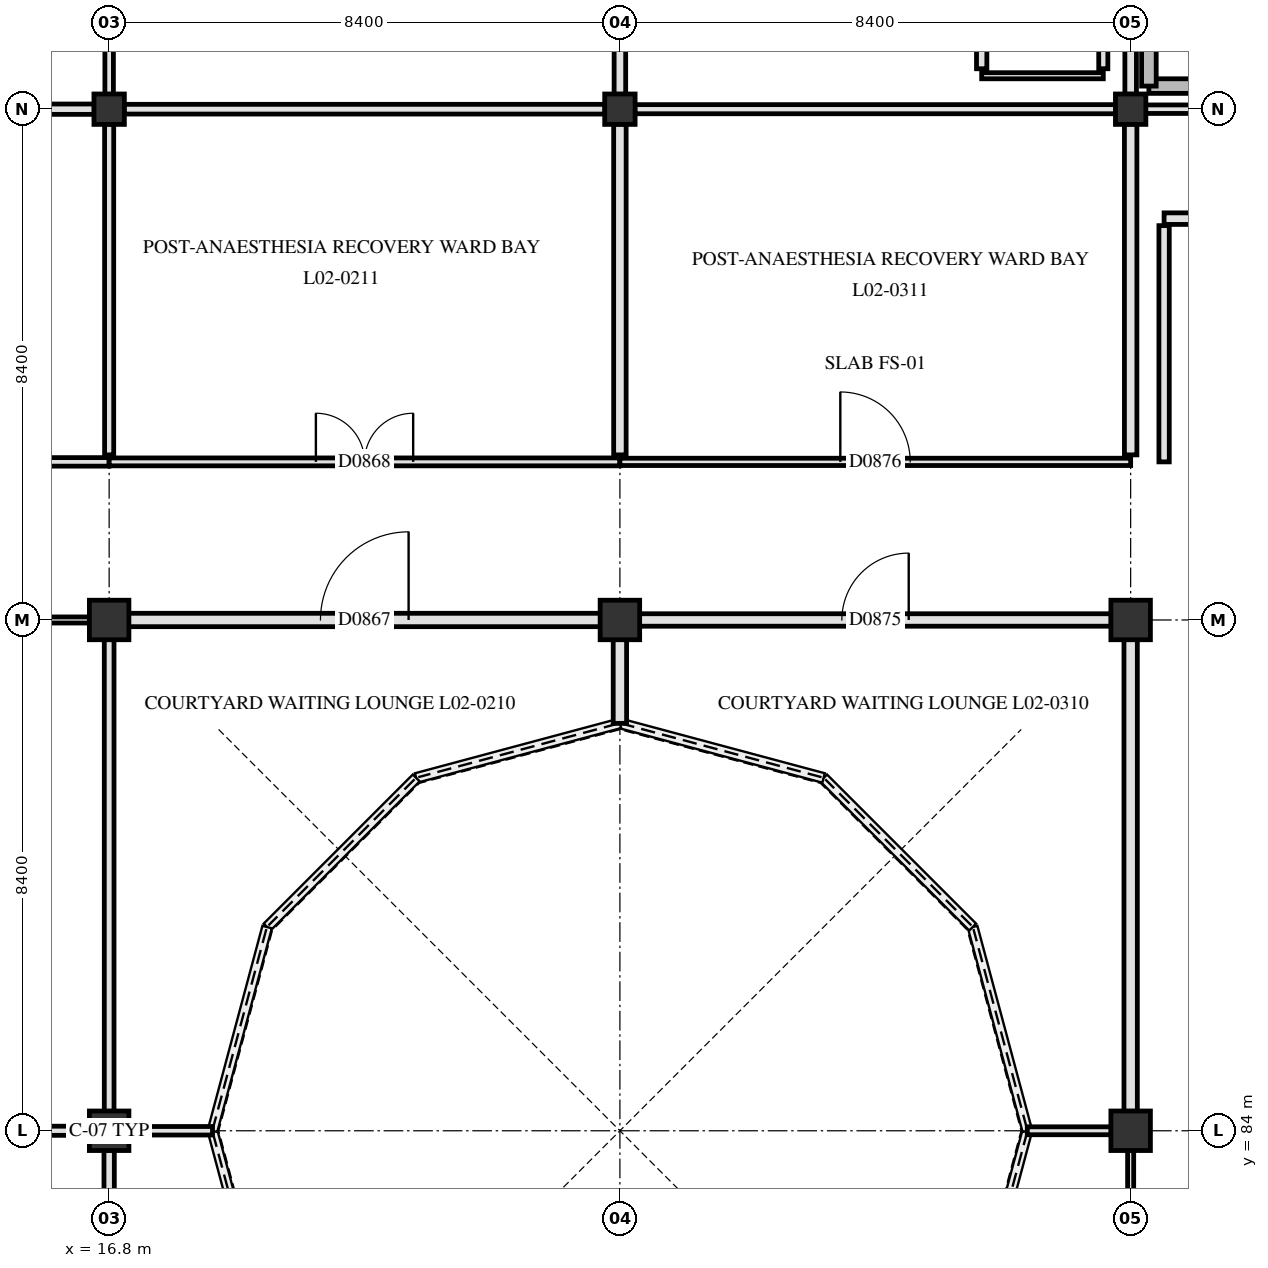
"""IFC4 building model, lengths in metres.
Left out: names, types, materials, properties, quantities, classifications, styles, units other than length and angle.
Written with IfcOpenShell. Run it as: python <this file> out.ifc"""

import sys

from ifc_helpers import new_model, si_unit, direction, frame, frame_2d, origin, origin_2d, place, context, subcontext, project, spatial, rectangle, circle, extrude, element, fill, save


model = new_model("IFC4")
c1 = context("Model", 3, precision=1e-05, world=origin(), true_north=direction((0.0, 1.0)))
c2 = subcontext(c1, "Body", "Model", "MODEL_VIEW")
j1 = project(units=[si_unit("LENGTHUNIT", "METRE"), si_unit("PLANEANGLEUNIT", "RADIAN")], contexts=[c1])
p1 = place(None, origin())
s1 = spatial("IfcSite", under=j1, at=p1, CompositionType="ELEMENT")
p2 = place(p1, origin())
s2 = spatial("IfcBuilding", under=s1, at=p2, CompositionType="ELEMENT")
p3 = place(p2, frame((0.0, 0.0, 9.3)))
s3 = spatial("IfcBuildingStorey", under=s2, at=p3, CompositionType="ELEMENT", Elevation=9.3)
for number, where, z_axis, x_axis in (
    (1, (16.8, 84.0, 0.0), (0.0, 0.0, 1.0), (1.0, 0.0, 0.0)),
    (2, (16.8, 92.4, 0.0), (0.0, 0.0, 1.0), (1.0, 0.0, 0.0)),
):
    element("IfcColumn", number, at=place(p3, frame(where, z_axis=z_axis, x_axis=x_axis)), inside=s3, PredefinedType="COLUMN", context=c2, shape_type="SweptSolid", body=[
        extrude(circle(Radius=0.325, at=origin_2d()), origin(), (0.0, 0.0, 1.0), 5.1),
    ])
p4 = place(p3, frame((16.8, 100.8, 0.0), z_axis=(0.0, 0.0, 1.0), x_axis=(1.0, 0.0, 0.0)))
e3 = element("IfcColumn", 3, at=p4, inside=s3, PredefinedType="COLUMN", context=c2, shape_type="SweptSolid", body=[
    extrude(rectangle(XDim=0.5, YDim=0.5, at=origin_2d()), origin(), (0.0, 0.0, 1.0), 5.1),
])
p5 = place(p3, frame((25.2, 92.4, 0.0), z_axis=(0.0, 0.0, 1.0), x_axis=(1.0, 0.0, 0.0)))
e4 = element("IfcColumn", 4, at=p5, inside=s3, PredefinedType="COLUMN", context=c2, shape_type="SweptSolid", body=[
    extrude(circle(Radius=0.325, at=origin_2d()), origin(), (0.0, 0.0, 1.0), 5.1),
])
p6 = place(p3, frame((25.2, 100.8, 0.0), z_axis=(0.0, 0.0, 1.0), x_axis=(1.0, 0.0, 0.0)))
e5 = element("IfcColumn", 5, at=p6, inside=s3, PredefinedType="COLUMN", context=c2, shape_type="SweptSolid", body=[
    extrude(rectangle(XDim=0.5, YDim=0.5, at=origin_2d()), origin(), (0.0, 0.0, 1.0), 5.1),
])
for number, where, z_axis, x_axis in (
    (6, (33.6, 84.0, 0.0), (0.0, 0.0, 1.0), (1.0, 0.0, 0.0)),
    (7, (33.6, 92.4, 0.0), (0.0, 0.0, 1.0), (1.0, 0.0, 0.0)),
):
    element("IfcColumn", number, at=place(p3, frame(where, z_axis=z_axis, x_axis=x_axis)), inside=s3, PredefinedType="COLUMN", context=c2, shape_type="SweptSolid", body=[
        extrude(circle(Radius=0.325, at=origin_2d()), origin(), (0.0, 0.0, 1.0), 5.1),
    ])
p7 = place(p3, frame((33.6, 100.8, 0.0), z_axis=(0.0, 0.0, 1.0), x_axis=(1.0, 0.0, 0.0)))
e8 = element("IfcColumn", 8, at=p7, inside=s3, PredefinedType="COLUMN", context=c2, shape_type="SweptSolid", body=[
    extrude(rectangle(XDim=0.5, YDim=0.5, at=origin_2d()), origin(), (0.0, 0.0, 1.0), 5.1),
])
p8 = place(p3, frame((33.9, 101.18, 0.0), z_axis=(0.0, 0.0, 1.0), x_axis=(1.0, 0.0, 0.0)))
e9 = element("IfcWall", 9, at=p8, inside=s3, PredefinedType="SHEAR", context=c2, shape_type="SweptSolid", body=[
    extrude(rectangle(XDim=7.82, YDim=0.24, at=frame_2d((3.91, 0.0))), origin(), (0.0, 0.0, 1.0), 4.78),
])
p9 = place(p3, frame((33.9, 101.18, 0.0), z_axis=(0.0, 0.0, 1.0), x_axis=(0.0, 1.0, 0.0)))
e10 = element("IfcWall", 10, at=p9, inside=s3, PredefinedType="SHEAR", context=c2, shape_type="SweptSolid", body=[
    extrude(rectangle(XDim=3.32, YDim=0.24, at=frame_2d((1.66, 0.0))), origin(), (0.0, 0.0, 1.0), 4.78),
])
p10 = place(p3, frame((8.645, 84.0, 0.0), z_axis=(0.0, 0.0, 1.0), x_axis=(1.0, 0.0, 0.0)))
e11 = element("IfcWall", 11, at=p10, inside=s3, PredefinedType="PARTITIONING", context=c2, shape_type="SweptSolid", body=[
    extrude(rectangle(XDim=7.835, YDim=0.15, at=frame_2d((3.917, 0.0))), origin(), (0.0, 0.0, 1.0), 4.02),
])
p11 = place(p3, frame((17.12, 84.0, 0.0), z_axis=(0.0, 0.0, 1.0), x_axis=(1.0, 0.0, 0.0)))
e12 = element("IfcWall", 12, at=p11, inside=s3, PredefinedType="PARTITIONING", context=c2, shape_type="SweptSolid", body=[
    extrude(rectangle(XDim=1.38, YDim=0.14, at=frame_2d((0.69, 0.0))), origin(), (0.0, 0.0, 1.0), 4.77),
])
p12 = place(p3, frame((31.9, 84.0, 0.0), z_axis=(0.0, 0.0, 1.0), x_axis=(1.0, 0.0, 0.0)))
e13 = element("IfcWall", 13, at=p12, inside=s3, PredefinedType="PARTITIONING", context=c2, shape_type="SweptSolid", body=[
    extrude(rectangle(XDim=1.38, YDim=0.13, at=frame_2d((0.69, 0.0))), origin(), (0.0, 0.0, 1.0), 4.77),
])
p13 = place(p3, frame((8.645, 92.4, 0.0), z_axis=(0.0, 0.0, 1.0), x_axis=(1.0, 0.0, 0.0)))
e14 = element("IfcWall", 14, at=p13, inside=s3, PredefinedType="PARTITIONING", context=c2, shape_type="SweptSolid", body=[
    extrude(rectangle(XDim=7.835, YDim=0.1, at=frame_2d((3.917, 0.0))), origin(), (0.0, 0.0, 1.0), 4.02),
])
p14 = place(p13, frame((3.327, 0.0, 0.0)))
e15 = element("IfcOpeningElement", 15, at=p14, cuts=e14, PredefinedType="OPENING", context=c2, shape_type="SweptSolid", body=[
    extrude(rectangle(XDim=1.18, YDim=2.18, at=frame_2d((0.59, 1.09))), frame((0.0, 0.06, 0.0), z_axis=(0.0, -1.0, 0.0), x_axis=(1.0, 0.0, 0.0)), (0.0, 0.0, 1.0), 0.12),
])
p15 = place(p3, frame((17.12, 92.4, 0.0), z_axis=(0.0, 0.0, 1.0), x_axis=(1.0, 0.0, 0.0)))
e16 = element("IfcWall", 16, at=p15, inside=s3, PredefinedType="PARTITIONING", context=c2, shape_type="SweptSolid", body=[
    extrude(rectangle(XDim=7.76, YDim=0.22, at=frame_2d((3.88, 0.0))), origin(), (0.0, 0.0, 1.0), 4.02),
])
p16 = place(p15, frame((3.155, 0.0, 0.0)))
e17 = element("IfcOpeningElement", 17, at=p16, cuts=e16, PredefinedType="OPENING", context=c2, shape_type="SweptSolid", body=[
    extrude(rectangle(XDim=1.45, YDim=2.2, at=frame_2d((0.725, 1.1))), frame((0.0, 0.12, 0.0), z_axis=(0.0, -1.0, 0.0), x_axis=(1.0, 0.0, 0.0)), (0.0, 0.0, 1.0), 0.24),
])
p17 = place(p3, frame((25.52, 92.4, 0.0), z_axis=(0.0, 0.0, 1.0), x_axis=(1.0, 0.0, 0.0)))
e18 = element("IfcWall", 18, at=p17, inside=s3, PredefinedType="PARTITIONING", context=c2, shape_type="SweptSolid", body=[
    extrude(rectangle(XDim=7.76, YDim=0.205, at=frame_2d((3.88, 0.0))), origin(), (0.0, 0.0, 1.0), 4.02),
])
p18 = place(p17, frame((3.33, 0.0, 0.0)))
e19 = element("IfcOpeningElement", 19, at=p18, cuts=e18, PredefinedType="OPENING", context=c2, shape_type="SweptSolid", body=[
    extrude(rectangle(XDim=1.1, YDim=2.15, at=frame_2d((0.55, 1.075))), frame((0.0, 0.113, 0.0), z_axis=(0.0, -1.0, 0.0), x_axis=(1.0, 0.0, 0.0)), (0.0, 0.0, 1.0), 0.225),
])
p19 = place(p3, frame((8.4, 95.0, 0.0), z_axis=(0.0, 0.0, 1.0), x_axis=(1.0, 0.0, 0.0)))
e20 = element("IfcWall", 20, at=p19, inside=s3, PredefinedType="PARTITIONING", context=c2, shape_type="SweptSolid", body=[
    extrude(rectangle(XDim=8.4, YDim=0.14, at=frame_2d((4.2, 0.0))), origin(), (0.0, 0.0, 1.0), 4.17),
])
p20 = place(p19, frame((3.56, 0.0, 0.0)))
e21 = element("IfcOpeningElement", 21, at=p20, cuts=e20, PredefinedType="OPENING", context=c2, shape_type="SweptSolid", body=[
    extrude(rectangle(XDim=1.28, YDim=2.18, at=frame_2d((0.64, 1.09))), frame((0.0, 0.08, 0.0), z_axis=(0.0, -1.0, 0.0), x_axis=(1.0, 0.0, 0.0)), (0.0, 0.0, 1.0), 0.16),
])
p21 = place(p3, frame((16.8, 95.0, 0.0), z_axis=(0.0, 0.0, 1.0), x_axis=(1.0, 0.0, 0.0)))
e22 = element("IfcWall", 22, at=p21, inside=s3, PredefinedType="PARTITIONING", context=c2, shape_type="SweptSolid", body=[
    extrude(rectangle(XDim=8.4, YDim=0.13, at=frame_2d((4.2, 0.0))), origin(), (0.0, 0.0, 1.0), 4.17),
])
p22 = place(p21, frame((3.4, 0.0, 0.0)))
e23 = element("IfcOpeningElement", 23, at=p22, cuts=e22, PredefinedType="OPENING", context=c2, shape_type="SweptSolid", body=[
    extrude(rectangle(XDim=1.6, YDim=2.25, at=frame_2d((0.8, 1.125))), frame((0.0, 0.075, 0.0), z_axis=(0.0, -1.0, 0.0), x_axis=(1.0, 0.0, 0.0)), (0.0, 0.0, 1.0), 0.15),
])
p23 = place(p3, frame((25.2, 95.0, 0.0), z_axis=(0.0, 0.0, 1.0), x_axis=(1.0, 0.0, 0.0)))
e24 = element("IfcWall", 24, at=p23, inside=s3, PredefinedType="PARTITIONING", context=c2, shape_type="SweptSolid", body=[
    extrude(rectangle(XDim=8.4, YDim=0.12, at=frame_2d((4.2, 0.0))), origin(), (0.0, 0.0, 1.0), 4.17),
])
p24 = place(p23, frame((3.625, 0.0, 0.0)))
e25 = element("IfcOpeningElement", 25, at=p24, cuts=e24, PredefinedType="OPENING", context=c2, shape_type="SweptSolid", body=[
    extrude(rectangle(XDim=1.15, YDim=2.15, at=frame_2d((0.575, 1.075))), frame((0.0, 0.07, 0.0), z_axis=(0.0, -1.0, 0.0), x_axis=(1.0, 0.0, 0.0)), (0.0, 0.0, 1.0), 0.14),
])
p25 = place(p3, frame((34.15, 99.0, 0.0), z_axis=(0.0, 0.0, 1.0), x_axis=(1.0, 0.0, 0.0)))
e26 = element("IfcWall", 26, at=p25, inside=s3, PredefinedType="PARTITIONING", context=c2, shape_type="SweptSolid", body=[
    extrude(rectangle(XDim=2.1, YDim=0.19, at=frame_2d((1.05, 0.0))), origin(), (0.0, 0.0, 1.0), 4.77),
])
p26 = place(p3, frame((8.645, 100.8, 0.0), z_axis=(0.0, 0.0, 1.0), x_axis=(1.0, 0.0, 0.0)))
e27 = element("IfcWall", 27, at=p26, inside=s3, PredefinedType="PARTITIONING", context=c2, shape_type="SweptSolid", body=[
    extrude(rectangle(XDim=7.91, YDim=0.17, at=frame_2d((3.955, 0.0))), origin(), (0.0, 0.0, 1.0), 4.02),
])
p27 = place(p3, frame((17.045, 100.8, 0.0), z_axis=(0.0, 0.0, 1.0), x_axis=(1.0, 0.0, 0.0)))
e28 = element("IfcWall", 28, at=p27, inside=s3, PredefinedType="PARTITIONING", context=c2, shape_type="SweptSolid", body=[
    extrude(rectangle(XDim=7.91, YDim=0.16, at=frame_2d((3.955, 0.0))), origin(), (0.0, 0.0, 1.0), 4.02),
])
p28 = place(p3, frame((25.445, 100.8, 0.0), z_axis=(0.0, 0.0, 1.0), x_axis=(1.0, 0.0, 0.0)))
e29 = element("IfcWall", 29, at=p28, inside=s3, PredefinedType="PARTITIONING", context=c2, shape_type="SweptSolid", body=[
    extrude(rectangle(XDim=7.91, YDim=0.15, at=frame_2d((3.955, 0.0))), origin(), (0.0, 0.0, 1.0), 4.02),
])
p29 = place(p3, frame((33.845, 100.8, 0.0), z_axis=(0.0, 0.0, 1.0), x_axis=(1.0, 0.0, 0.0)))
e30 = element("IfcWall", 30, at=p29, inside=s3, PredefinedType="PARTITIONING", context=c2, shape_type="SweptSolid", body=[
    extrude(rectangle(XDim=7.86, YDim=0.14, at=frame_2d((3.93, 0.0))), origin(), (0.0, 0.0, 1.0), 4.02),
])
p30 = place(p3, frame((31.15, 101.35, 0.0), z_axis=(0.0, 0.0, 1.0), x_axis=(1.0, 0.0, 0.0)))
e31 = element("IfcWall", 31, at=p30, inside=s3, PredefinedType="PARTITIONING", context=c2, shape_type="SweptSolid", body=[
    extrude(rectangle(XDim=2.0, YDim=0.1, at=frame_2d((1.0, 0.0))), origin(), (0.0, 0.0, 1.0), 4.77),
])
p31 = place(p3, frame((16.8, 78.315, 0.0), z_axis=(0.0, 0.0, 1.0), x_axis=(0.0, 1.0, 0.0)))
e32 = element("IfcWall", 32, at=p31, inside=s3, PredefinedType="PARTITIONING", context=c2, shape_type="SweptSolid", body=[
    extrude(rectangle(XDim=5.365, YDim=0.17, at=frame_2d((2.683, 0.0))), origin(), (0.0, 0.0, 1.0), 4.17),
])
p32 = place(p3, frame((16.8, 84.32, 0.0), z_axis=(0.0, 0.0, 1.0), x_axis=(0.0, 1.0, 0.0)))
e33 = element("IfcWall", 33, at=p32, inside=s3, PredefinedType="PARTITIONING", context=c2, shape_type="SweptSolid", body=[
    extrude(rectangle(XDim=7.76, YDim=0.16, at=frame_2d((3.88, 0.0))), origin(), (0.0, 0.0, 1.0), 4.17),
])
p33 = place(p3, frame((16.8, 95.115, 0.0), z_axis=(0.0, 0.0, 1.0), x_axis=(0.0, 1.0, 0.0)))
e34 = element("IfcWall", 34, at=p33, inside=s3, PredefinedType="PARTITIONING", context=c2, shape_type="SweptSolid", body=[
    extrude(rectangle(XDim=5.44, YDim=0.15, at=frame_2d((2.72, 0.0))), origin(), (0.0, 0.0, 1.0), 4.17),
])
p34 = place(p3, frame((16.8, 101.045, 0.0), z_axis=(0.0, 0.0, 1.0), x_axis=(0.0, 1.0, 0.0)))
e35 = element("IfcWall", 35, at=p34, inside=s3, PredefinedType="PARTITIONING", context=c2, shape_type="SweptSolid", body=[
    extrude(rectangle(XDim=5.44, YDim=0.14, at=frame_2d((2.72, 0.0))), origin(), (0.0, 0.0, 1.0), 4.17),
])
p35 = place(p3, frame((25.2, 90.7, 0.0), z_axis=(0.0, 0.0, 1.0), x_axis=(0.0, 1.0, 0.0)))
e36 = element("IfcWall", 36, at=p35, inside=s3, PredefinedType="PARTITIONING", context=c2, shape_type="SweptSolid", body=[
    extrude(rectangle(XDim=1.38, YDim=0.22, at=frame_2d((0.69, 0.0))), origin(), (0.0, 0.0, 1.0), 4.77),
])
p36 = place(p3, frame((25.2, 95.115, 0.0), z_axis=(0.0, 0.0, 1.0), x_axis=(0.0, 1.0, 0.0)))
e37 = element("IfcWall", 37, at=p36, inside=s3, PredefinedType="PARTITIONING", context=c2, shape_type="SweptSolid", body=[
    extrude(rectangle(XDim=5.44, YDim=0.205, at=frame_2d((2.72, 0.0))), origin(), (0.0, 0.0, 1.0), 4.17),
])
p37 = place(p3, frame((25.2, 101.045, 0.0), z_axis=(0.0, 0.0, 1.0), x_axis=(0.0, 1.0, 0.0)))
e38 = element("IfcWall", 38, at=p37, inside=s3, PredefinedType="PARTITIONING", context=c2, shape_type="SweptSolid", body=[
    extrude(rectangle(XDim=5.44, YDim=0.19, at=frame_2d((2.72, 0.0))), origin(), (0.0, 0.0, 1.0), 4.17),
])
p38 = place(p3, frame((31.15, 101.465, 0.0), z_axis=(0.0, 0.0, 1.0), x_axis=(0.0, 1.0, 0.0)))
e39 = element("IfcWall", 39, at=p38, inside=s3, PredefinedType="PARTITIONING", context=c2, shape_type="SweptSolid", body=[
    extrude(rectangle(XDim=5.02, YDim=0.17, at=frame_2d((2.51, 0.0))), origin(), (0.0, 0.0, 1.0), 4.77),
])
p39 = place(p3, frame((33.15, 101.465, 0.0), z_axis=(0.0, 0.0, 1.0), x_axis=(0.0, 1.0, 0.0)))
e40 = element("IfcWall", 40, at=p39, inside=s3, PredefinedType="PARTITIONING", context=c2, shape_type="SweptSolid", body=[
    extrude(rectangle(XDim=5.135, YDim=0.15, at=frame_2d((2.567, 0.0))), origin(), (0.0, 0.0, 1.0), 4.77),
])
p40 = place(p3, frame((33.6, 78.315, 0.0), z_axis=(0.0, 0.0, 1.0), x_axis=(0.0, 1.0, 0.0)))
e41 = element("IfcWall", 41, at=p40, inside=s3, PredefinedType="PARTITIONING", context=c2, shape_type="SweptSolid", body=[
    extrude(rectangle(XDim=5.365, YDim=0.1, at=frame_2d((2.683, 0.0))), origin(), (0.0, 0.0, 1.0), 4.17),
])
p41 = place(p3, frame((33.6, 84.32, 0.0), z_axis=(0.0, 0.0, 1.0), x_axis=(0.0, 1.0, 0.0)))
e42 = element("IfcWall", 42, at=p41, inside=s3, PredefinedType="PARTITIONING", context=c2, shape_type="SweptSolid", body=[
    extrude(rectangle(XDim=7.76, YDim=0.22, at=frame_2d((3.88, 0.0))), origin(), (0.0, 0.0, 1.0), 4.17),
])
p42 = place(p3, frame((33.6, 95.115, 0.0), z_axis=(0.0, 0.0, 1.0), x_axis=(0.0, 1.0, 0.0)))
e43 = element("IfcWall", 43, at=p42, inside=s3, PredefinedType="PARTITIONING", context=c2, shape_type="SweptSolid", body=[
    extrude(rectangle(XDim=5.44, YDim=0.205, at=frame_2d((2.72, 0.0))), origin(), (0.0, 0.0, 1.0), 4.17),
])
p43 = place(p3, frame((33.6, 101.045, 0.0), z_axis=(0.0, 0.0, 1.0), x_axis=(0.0, 1.0, 0.0)))
e44 = element("IfcWall", 44, at=p43, inside=s3, PredefinedType="PARTITIONING", context=c2, shape_type="SweptSolid", body=[
    extrude(rectangle(XDim=5.555, YDim=0.19, at=frame_2d((2.778, 0.0))), origin(), (0.0, 0.0, 1.0), 4.17),
])
p44 = place(p3, frame((34.15, 95.0, 0.0), z_axis=(0.0, 0.0, 1.0), x_axis=(0.0, 1.0, 0.0)))
e45 = element("IfcWall", 45, at=p44, inside=s3, PredefinedType="PARTITIONING", context=c2, shape_type="SweptSolid", body=[
    extrude(rectangle(XDim=3.885, YDim=0.17, at=frame_2d((1.942, 0.0))), origin(), (0.0, 0.0, 1.0), 4.77),
])
p45 = place(p16, origin())
e46 = element("IfcDoor", 46, at=p45, inside=s3, OperationType="SINGLE_SWING_RIGHT", PredefinedType="DOOR", context=c2, shape_type="SweptSolid", body=[
    extrude(rectangle(XDim=1.45, YDim=2.2, at=frame_2d((0.725, 1.1))), frame((0.0, 0.025, 0.0), z_axis=(0.0, -1.0, 0.0), x_axis=(1.0, 0.0, 0.0)), (0.0, 0.0, 1.0), 0.05),
])
fill(e17, e46)
p46 = place(p22, origin())
e47 = element("IfcDoor", 47, at=p46, inside=s3, OperationType="DOUBLE_SWING_LEFT", PredefinedType="DOOR", context=c2, shape_type="SweptSolid", body=[
    extrude(rectangle(XDim=1.6, YDim=2.25, at=frame_2d((0.8, 1.125))), frame((0.0, 0.025, 0.0), z_axis=(0.0, -1.0, 0.0), x_axis=(1.0, 0.0, 0.0)), (0.0, 0.0, 1.0), 0.05),
])
fill(e23, e47)
p47 = place(p18, origin())
e48 = element("IfcDoor", 48, at=p47, inside=s3, OperationType="SINGLE_SWING_RIGHT", PredefinedType="DOOR", context=c2, shape_type="SweptSolid", body=[
    extrude(rectangle(XDim=1.1, YDim=2.15, at=frame_2d((0.55, 1.075))), frame((0.0, 0.025, 0.0), z_axis=(0.0, -1.0, 0.0), x_axis=(1.0, 0.0, 0.0)), (0.0, 0.0, 1.0), 0.05),
])
fill(e19, e48)
p48 = place(p24, origin())
e49 = element("IfcDoor", 49, at=p48, inside=s3, OperationType="SINGLE_SWING_LEFT", PredefinedType="DOOR", context=c2, shape_type="SweptSolid", body=[
    extrude(rectangle(XDim=1.15, YDim=2.15, at=frame_2d((0.575, 1.075))), frame((0.0, 0.025, 0.0), z_axis=(0.0, -1.0, 0.0), x_axis=(1.0, 0.0, 0.0)), (0.0, 0.0, 1.0), 0.05),
])
fill(e25, e49)
save(model, sys.argv[1])
